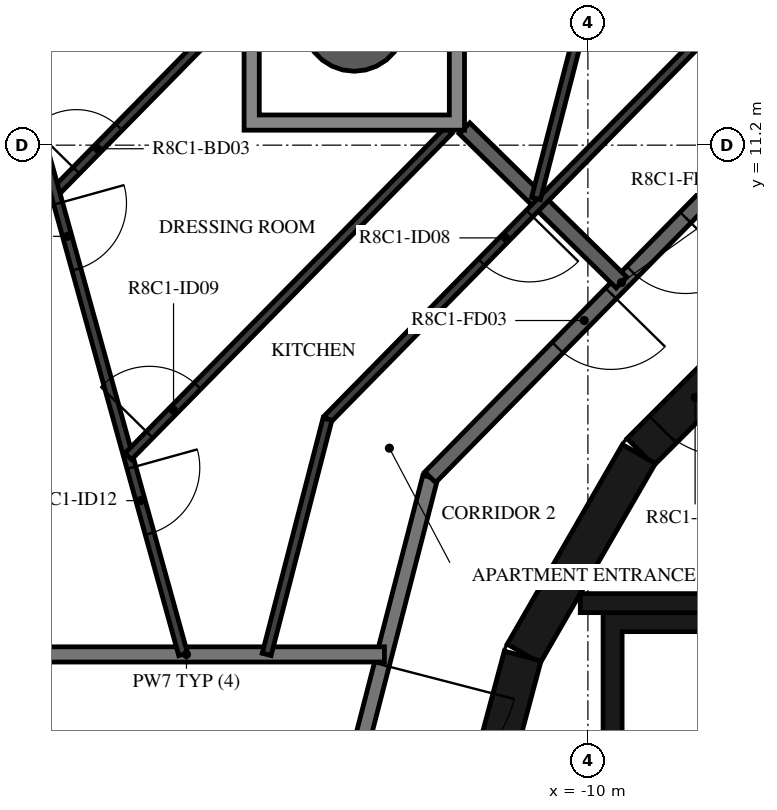
"""IFC4 building model, lengths in metres.
Left out: names, types, materials, properties, quantities, classifications, styles, units other than length and angle.
Written with IfcOpenShell. Run it as: python <this file> out.ifc"""

import sys

from ifc_helpers import new_model, si_unit, direction, frame, frame_2d, origin, origin_2d, place, context, subcontext, project, spatial, polyline, rectangle, hollow_circle, outline, extrude, element, fill, save


model = new_model("IFC4")
c1 = context("Model", 3, precision=1e-05, world=origin(), true_north=direction((0.0, 1.0)))
c2 = subcontext(c1, "Body", "Model", "MODEL_VIEW")
j1 = project(units=[si_unit("LENGTHUNIT", "METRE"), si_unit("PLANEANGLEUNIT", "RADIAN")], contexts=[c1])
p1 = place(None, origin())
s1 = spatial("IfcSite", under=j1, at=p1, CompositionType="ELEMENT")
p2 = place(p1, origin())
s2 = spatial("IfcBuilding", under=s1, at=p2, CompositionType="ELEMENT")
p3 = place(p2, frame((0.0, 0.0, 322.7)))
s3 = spatial("IfcBuildingStorey", under=s2, at=p3, CompositionType="ELEMENT", Elevation=322.7)
p4 = place(p3, frame((-13.073, 12.847, -0.38), z_axis=(0.0, 0.0, 1.0), x_axis=(1.0, 0.0, 0.0)))
e1 = element("IfcColumn", 1, at=p4, inside=s3, PredefinedType="COLUMN", context=c2, shape_type="SweptSolid", body=[
    extrude(hollow_circle(Radius=0.675, WallThickness=0.03, at=origin_2d()), origin(), (0.0, 0.0, 1.0), 2.616),
])
p5 = place(p3, frame((-7.164, 9.308, 0.0), z_axis=(0.0, 0.0, 1.0), x_axis=(-0.707106781187, -0.707106781187, 0.0)))
e2 = element("IfcWall", 2, at=p5, inside=s3, PredefinedType="SHEAR", context=c2, shape_type="SweptSolid", body=[
    extrude(rectangle(XDim=3.032, YDim=0.5, at=frame_2d((1.516, 0.0))), origin(), (0.0, 0.0, 1.0), 3.05),
])
p6 = place(p5, frame((1.416, 0.0, 0.0)))
e3 = element("IfcOpeningElement", 3, at=p6, cuts=e2, PredefinedType="OPENING", context=c2, shape_type="SweptSolid", body=[
    extrude(rectangle(XDim=1.2, YDim=2.1, at=frame_2d((0.6, 1.05))), frame((0.0, 0.26, 0.0), z_axis=(0.0, -1.0, 0.0), x_axis=(1.0, 0.0, 0.0)), (0.0, 0.0, 1.0), 0.52),
])
for number, where, z_axis, x_axis in (
    (4, (-9.329, 7.137, 0.0), (0.0, 0.0, 1.0), (-0.5, -0.866, 0.0)),
    (5, (-10.858, 4.479, 0.0), (0.0, 0.0, 1.0), (-0.259, -0.966, 0.0)),
):
    element("IfcWall", number, at=place(p3, frame(where, z_axis=z_axis, x_axis=x_axis)), inside=s3, PredefinedType="SHEAR", context=c2, shape_type="SweptSolid", body=[
        extrude(rectangle(XDim=3.033, YDim=0.5, at=frame_2d((1.516, 0.0))), origin(), (0.0, 0.0, 1.0), 3.05),
    ])
p7 = place(p3, frame((-7.0, 5.175, 0.0), z_axis=(0.0, 0.0, 1.0), x_axis=(-1.0, 0.0, 0.0)))
e6 = element("IfcWall", 6, at=p7, inside=s3, PredefinedType="SHEAR", context=c2, shape_type="SweptSolid", body=[
    extrude(rectangle(XDim=3.1, YDim=0.25, at=frame_2d((1.55, 0.0))), origin(), (0.0, 0.0, 1.0), 3.05),
])
p8 = place(p3, origin())
e7 = element("IfcWall", 7, at=p8, inside=s3, PredefinedType="SHEAR", context=c2, shape_type="SweptSolid", body=[
    extrude(outline(polyline([(-9.8, 1.9), (-9.55, 1.9), (-9.55, 4.8), (-5.5, 4.8), (-5.5, 1.9), (-5.25, 1.9), (-5.25, 4.8), (3.1, 4.8), (3.1, 1.9), (3.35, 1.9), (3.35, 4.8), (5.25, 4.8), (5.25, 1.9), (5.5, 1.9), (5.5, 4.8), (7.4, 4.8), (7.4, 1.9), (7.65, 1.9), (7.65, 4.8), (9.55, 4.8), (9.55, 1.9), (9.8, 1.9), (9.8, 4.8), (9.8, 5.05), (-9.8, 5.05), (-9.8, 4.8), (-9.8, 1.9)])), origin(), (0.0, 0.0, 1.0), 3.05),
])
p9 = place(p3, frame((-12.074, 6.831, 0.0), z_axis=(0.0, 0.0, 1.0), x_axis=(-0.250391063186, -0.968144780225, 0.0)))
e8 = element("IfcWall", 8, at=p9, inside=s3, PredefinedType="STANDARD", context=c2, shape_type="SweptSolid", body=[
    extrude(rectangle(XDim=7.181, YDim=0.2, at=frame_2d((3.591, 0.0))), origin(), (0.0, 0.0, 1.0), 3.05),
])
p10 = place(p9, frame((2.548, 0.0, 0.0)))
e9 = element("IfcOpeningElement", 9, at=p10, cuts=e8, PredefinedType="OPENING", context=c2, shape_type="SweptSolid", body=[
    extrude(rectangle(XDim=1.8, YDim=2.1, at=frame_2d((0.9, 1.05))), frame((0.0, 0.11, 0.0), z_axis=(0.0, -1.0, 0.0), x_axis=(1.0, 0.0, 0.0)), (0.0, 0.0, 1.0), 0.22),
])
p11 = place(p3, frame((-7.041, 11.953, 0.0), z_axis=(0.0, 0.0, 1.0), x_axis=(-0.70090916255, -0.713250549143, 0.0)))
e10 = element("IfcWall", 10, at=p11, inside=s3, PredefinedType="STANDARD", context=c2, shape_type="SweptSolid", body=[
    extrude(rectangle(XDim=7.181, YDim=0.2, at=frame_2d((3.59, 0.0))), origin(), (0.0, 0.0, 1.0), 3.05),
])
p12 = place(p11, frame((2.39, 0.0, 0.0)))
e11 = element("IfcOpeningElement", 11, at=p12, cuts=e10, PredefinedType="OPENING", context=c2, shape_type="SweptSolid", body=[
    extrude(rectangle(XDim=1.0, YDim=2.1, at=frame_2d((0.5, 1.05))), frame((0.0, 0.11, 0.0), z_axis=(0.0, -1.0, 0.0), x_axis=(1.0, 0.0, 0.0)), (0.0, 0.0, 1.0), 0.22),
])
p13 = place(p11, frame((3.791, 0.0, 0.0)))
e12 = element("IfcOpeningElement", 12, at=p13, cuts=e10, PredefinedType="OPENING", context=c2, shape_type="SweptSolid", body=[
    extrude(rectangle(XDim=1.0, YDim=2.1, at=frame_2d((0.5, 1.05))), frame((0.0, 0.11, 0.0), z_axis=(0.0, -1.0, 0.0), x_axis=(1.0, 0.0, 0.0)), (0.0, 0.0, 1.0), 0.22),
])
p14 = place(p3, frame((-12.677, 4.5, 0.0), z_axis=(0.0, 0.0, 1.0), x_axis=(-1.0, 0.0, 0.0)))
e13 = element("IfcWall", 13, at=p14, inside=s3, PredefinedType="STANDARD", context=c2, shape_type="SweptSolid", body=[
    extrude(rectangle(XDim=5.208, YDim=0.2, at=frame_2d((2.604, 0.0))), origin(), (0.0, 0.0, 1.0), 3.05),
])
p15 = place(p3, frame((-11.623, 11.422, 0.0), z_axis=(0.0, 0.0, 1.0), x_axis=(0.713233657229, -0.700926351478, 0.0)))
e14 = element("IfcWall", 14, at=p15, inside=s3, PredefinedType="STANDARD", context=c2, shape_type="SweptSolid", body=[
    extrude(rectangle(XDim=2.896, YDim=0.2, at=frame_2d((1.448, 0.0))), origin(), (0.0, 0.0, 1.0), 3.05),
])
p16 = place(p3, frame((-8.413, 12.698, 0.0), z_axis=(0.0, 0.0, 1.0), x_axis=(-0.700901588882, -0.713257991686, 0.0)))
e15 = element("IfcWall", 15, at=p16, inside=s3, PredefinedType="PARTITIONING", context=c2, shape_type="SweptSolid", body=[
    extrude(rectangle(XDim=7.153, YDim=0.12, at=frame_2d((3.576, 0.0))), origin(), (0.0, 0.0, 1.0), 3.05),
])
p17 = place(p16, frame((3.36, 0.0, 0.0)))
e16 = element("IfcOpeningElement", 16, at=p17, cuts=e15, PredefinedType="OPENING", context=c2, shape_type="SweptSolid", body=[
    extrude(rectangle(XDim=0.9, YDim=2.1, at=frame_2d((0.45, 1.05))), frame((0.0, 0.07, 0.0), z_axis=(0.0, -1.0, 0.0), x_axis=(1.0, 0.0, 0.0)), (0.0, 0.0, 1.0), 0.14),
])
p18 = place(p3, frame((-9.162, 16.38, 0.0), z_axis=(0.0, 0.0, 1.0), x_axis=(-0.250384770134, -0.968146407774, 0.0)))
e17 = element("IfcWall", 17, at=p18, inside=s3, PredefinedType="PARTITIONING", context=c2, shape_type="SweptSolid", body=[
    extrude(rectangle(XDim=6.076, YDim=0.12, at=frame_2d((3.038, 0.0))), origin(), (0.0, 0.0, 1.0), 3.05),
])
p19 = place(p3, frame((-13.426, 7.596, 0.0), z_axis=(0.0, 0.0, 1.0), x_axis=(-0.250342106136, -0.968157440655, 0.0)))
e18 = element("IfcWall", 18, at=p19, inside=s3, PredefinedType="PARTITIONING", context=c2, shape_type="SweptSolid", body=[
    extrude(rectangle(XDim=3.198, YDim=0.12, at=frame_2d((1.599, 0.0))), origin(), (0.0, 0.0, 1.0), 3.05),
])
p20 = place(p3, frame((-17.011, 10.582, 0.0), z_axis=(0.0, 0.0, 1.0), x_axis=(0.700924288011, 0.713235685083, 0.0)))
e19 = element("IfcWall", 19, at=p20, inside=s3, PredefinedType="PARTITIONING", context=c2, shape_type="SweptSolid", body=[
    extrude(rectangle(XDim=3.55, YDim=0.12, at=frame_2d((1.775, 0.0))), origin(), (0.0, 0.0, 1.0), 3.05),
])
p21 = place(p20, frame((0.4, 0.0, 0.0)))
e20 = element("IfcOpeningElement", 20, at=p21, cuts=e19, PredefinedType="OPENING", context=c2, shape_type="SweptSolid", body=[
    extrude(rectangle(XDim=0.8, YDim=2.1, at=frame_2d((0.4, 1.05))), frame((0.0, 0.07, 0.0), z_axis=(0.0, -1.0, 0.0), x_axis=(1.0, 0.0, 0.0)), (0.0, 0.0, 1.0), 0.14),
])
p22 = place(p3, frame((-17.257, 11.469, 0.0), z_axis=(0.0, 0.0, 1.0), x_axis=(0.267222501114, -0.963634855585, 0.0)))
e21 = element("IfcWall", 21, at=p22, inside=s3, PredefinedType="PARTITIONING", context=c2, shape_type="SweptSolid", body=[
    extrude(rectangle(XDim=7.232, YDim=0.12, at=frame_2d((3.616, 0.0))), origin(), (0.0, 0.0, 1.0), 3.05),
])
p23 = place(p22, frame((1.074, 0.0, 0.0)))
e22 = element("IfcOpeningElement", 22, at=p23, cuts=e21, PredefinedType="OPENING", context=c2, shape_type="SweptSolid", body=[
    extrude(rectangle(XDim=0.9, YDim=2.1, at=frame_2d((0.45, 1.05))), frame((0.0, 0.07, 0.0), z_axis=(0.0, -1.0, 0.0), x_axis=(1.0, 0.0, 0.0)), (0.0, 0.0, 1.0), 0.14),
])
p24 = place(p22, frame((4.682, 0.0, 0.0)))
e23 = element("IfcOpeningElement", 23, at=p24, cuts=e21, PredefinedType="OPENING", context=c2, shape_type="SweptSolid", body=[
    extrude(rectangle(XDim=0.9, YDim=2.1, at=frame_2d((0.45, 1.05))), frame((0.0, 0.07, 0.0), z_axis=(0.0, -1.0, 0.0), x_axis=(1.0, 0.0, 0.0)), (0.0, 0.0, 1.0), 0.14),
])
p25 = place(p3, frame((-16.047, 7.105, 0.0), z_axis=(0.0, 0.0, 1.0), x_axis=(0.700892382646, 0.713267038316, 0.0)))
e24 = element("IfcWall", 24, at=p25, inside=s3, PredefinedType="PARTITIONING", context=c2, shape_type="SweptSolid", body=[
    extrude(rectangle(XDim=6.017, YDim=0.12, at=frame_2d((3.009, 0.0))), origin(), (0.0, 0.0, 1.0), 3.05),
])
p26 = place(p25, frame((0.4, 0.0, 0.0)))
e25 = element("IfcOpeningElement", 25, at=p26, cuts=e24, PredefinedType="OPENING", context=c2, shape_type="SweptSolid", body=[
    extrude(rectangle(XDim=0.9, YDim=2.1, at=frame_2d((0.45, 1.05))), frame((0.0, 0.07, 0.0), z_axis=(0.0, -1.0, 0.0), x_axis=(1.0, 0.0, 0.0)), (0.0, 0.0, 1.0), 0.14),
])
p27 = place(p3, origin())
e26 = element("IfcWall", 26, at=p27, inside=s3, PredefinedType="STANDARD", context=c2, shape_type="SweptSolid", body=[
    extrude(outline(polyline([(-11.623, 14.297), (-11.623, 11.397), (-14.523, 11.397), (-14.523, 14.297), (-11.623, 14.297)]), holes=[polyline([(-14.323, 11.597), (-11.823, 11.597), (-11.823, 14.097), (-14.323, 14.097), (-14.323, 11.597)])]), origin(), (0.0, 0.0, 1.0), 3.05),
])
p28 = place(p6, origin())
e27 = element("IfcDoor", 27, at=p28, inside=s3, OperationType="SINGLE_SWING_RIGHT", PredefinedType="DOOR", context=c2, shape_type="SweptSolid", body=[
    extrude(rectangle(XDim=1.2, YDim=2.1, at=frame_2d((0.6, 1.05))), frame((0.0, 0.025, 0.0), z_axis=(0.0, -1.0, 0.0), x_axis=(1.0, 0.0, 0.0)), (0.0, 0.0, 1.0), 0.05),
])
fill(e3, e27)
p29 = place(p12, origin())
e28 = element("IfcDoor", 28, at=p29, inside=s3, OperationType="SINGLE_SWING_RIGHT", PredefinedType="DOOR", context=c2, shape_type="SweptSolid", body=[
    extrude(rectangle(XDim=1.0, YDim=2.1, at=frame_2d((0.5, 1.05))), frame((0.0, 0.025, 0.0), z_axis=(0.0, -1.0, 0.0), x_axis=(1.0, 0.0, 0.0)), (0.0, 0.0, 1.0), 0.05),
])
fill(e11, e28)
p30 = place(p13, origin())
e29 = element("IfcDoor", 29, at=p30, inside=s3, OperationType="SINGLE_SWING_LEFT", PredefinedType="DOOR", context=c2, shape_type="SweptSolid", body=[
    extrude(rectangle(XDim=1.0, YDim=2.1, at=frame_2d((0.5, 1.05))), frame((0.0, 0.025, 0.0), z_axis=(0.0, -1.0, 0.0), x_axis=(1.0, 0.0, 0.0)), (0.0, 0.0, 1.0), 0.05),
])
fill(e12, e29)
p31 = place(p17, origin())
e30 = element("IfcDoor", 30, at=p31, inside=s3, OperationType="SINGLE_SWING_LEFT", PredefinedType="DOOR", context=c2, shape_type="SweptSolid", body=[
    extrude(rectangle(XDim=0.9, YDim=2.1, at=frame_2d((0.45, 1.05))), frame((0.0, 0.025, 0.0), z_axis=(0.0, -1.0, 0.0), x_axis=(1.0, 0.0, 0.0)), (0.0, 0.0, 1.0), 0.05),
])
fill(e16, e30)
p32 = place(p26, origin())
e31 = element("IfcDoor", 31, at=p32, inside=s3, OperationType="SINGLE_SWING_LEFT", PredefinedType="DOOR", context=c2, shape_type="SweptSolid", body=[
    extrude(rectangle(XDim=0.9, YDim=2.1, at=frame_2d((0.45, 1.05))), frame((0.0, 0.025, 0.0), z_axis=(0.0, -1.0, 0.0), x_axis=(1.0, 0.0, 0.0)), (0.0, 0.0, 1.0), 0.05),
])
fill(e25, e31)
p33 = place(p21, origin())
e32 = element("IfcDoor", 32, at=p33, inside=s3, OperationType="SINGLE_SWING_LEFT", PredefinedType="DOOR", context=c2, shape_type="SweptSolid", body=[
    extrude(rectangle(XDim=0.8, YDim=2.1, at=frame_2d((0.4, 1.05))), frame((0.0, 0.025, 0.0), z_axis=(0.0, -1.0, 0.0), x_axis=(1.0, 0.0, 0.0)), (0.0, 0.0, 1.0), 0.05),
])
fill(e20, e32)
p34 = place(p23, origin())
e33 = element("IfcDoor", 33, at=p34, inside=s3, OperationType="SINGLE_SWING_LEFT", PredefinedType="DOOR", context=c2, shape_type="SweptSolid", body=[
    extrude(rectangle(XDim=0.9, YDim=2.1, at=frame_2d((0.45, 1.05))), frame((0.0, 0.025, 0.0), z_axis=(0.0, -1.0, 0.0), x_axis=(1.0, 0.0, 0.0)), (0.0, 0.0, 1.0), 0.05),
])
fill(e22, e33)
p35 = place(p24, origin())
e34 = element("IfcDoor", 34, at=p35, inside=s3, OperationType="SINGLE_SWING_RIGHT", PredefinedType="DOOR", context=c2, shape_type="SweptSolid", body=[
    extrude(rectangle(XDim=0.9, YDim=2.1, at=frame_2d((0.45, 1.05))), frame((0.0, 0.025, 0.0), z_axis=(0.0, -1.0, 0.0), x_axis=(1.0, 0.0, 0.0)), (0.0, 0.0, 1.0), 0.05),
])
fill(e23, e34)
p36 = place(p10, origin())
e35 = element("IfcDoor", 35, at=p36, inside=s3, OperationType="DOUBLE_DOOR_SINGLE_SWING", PredefinedType="DOOR", context=c2, shape_type="SweptSolid", body=[
    extrude(rectangle(XDim=1.8, YDim=2.1, at=frame_2d((0.9, 1.05))), frame((0.0, 0.025, 0.0), z_axis=(0.0, -1.0, 0.0), x_axis=(1.0, 0.0, 0.0)), (0.0, 0.0, 1.0), 0.05),
])
fill(e9, e35)
save(model, sys.argv[1])
